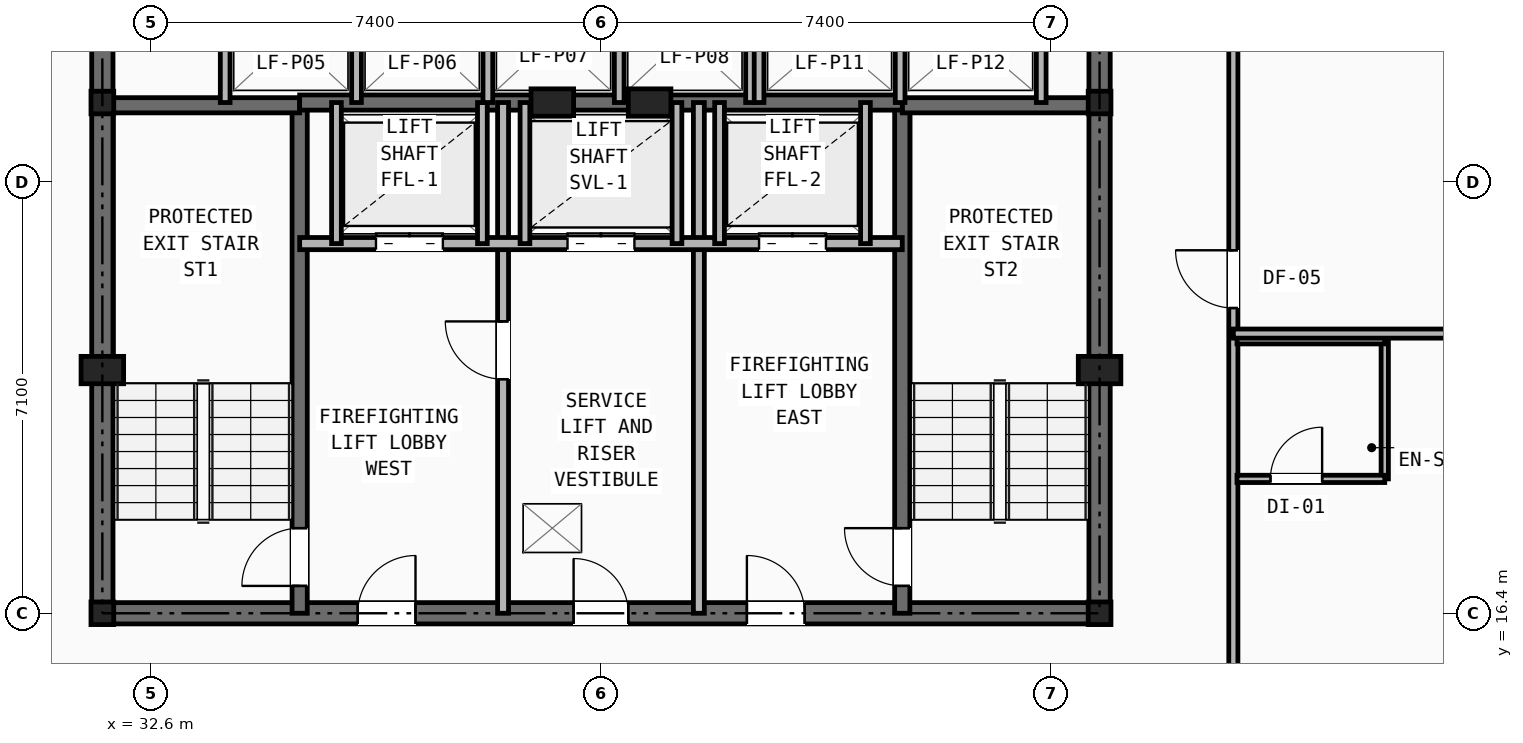
"""IFC4 building model, lengths in metres.
Left out: names, types, materials, properties, quantities, classifications, styles, units other than length and angle.
Written with IfcOpenShell. Run it as: python <this file> out.ifc"""

import sys

from ifc_helpers import new_model, si_unit, direction, frame, frame_2d, origin, origin_2d, place, context, subcontext, project, spatial, rectangle, i_section, extrude, element, fill, save


model = new_model("IFC4")
c1 = context("Model", 3, precision=1e-05, world=origin(), true_north=direction((0.0, 1.0)))
c2 = subcontext(c1, "Body", "Model", "MODEL_VIEW")
j1 = project(units=[si_unit("LENGTHUNIT", "METRE"), si_unit("PLANEANGLEUNIT", "RADIAN")], contexts=[c1])
p1 = place(None, origin())
s1 = spatial("IfcSite", under=j1, at=p1, CompositionType="ELEMENT")
p2 = place(p1, origin())
s2 = spatial("IfcBuilding", under=s1, at=p2, CompositionType="ELEMENT")
p3 = place(p2, frame((0.0, 0.0, 36.8)))
s3 = spatial("IfcBuildingStorey", under=s2, at=p3, CompositionType="ELEMENT", Elevation=36.8)
for number, where, z_axis, x_axis in (
    (1, (31.8, 16.4, 0.0), (0.0, 0.0, 1.0), (1.0, 0.0, 0.0)),
    (2, (48.2, 16.4, 0.0), (0.0, 0.0, 1.0), (1.0, 0.0, 0.0)),
    (3, (31.8, 24.8, 0.0), (0.0, 0.0, 1.0), (1.0, 0.0, 0.0)),
    (4, (48.2, 24.8, 0.0), (0.0, 0.0, 1.0), (1.0, 0.0, 0.0)),
):
    element("IfcColumn", number, at=place(p3, frame(where, z_axis=z_axis, x_axis=x_axis)), inside=s3, PredefinedType="COLUMN", context=c2, shape_type="SweptSolid", body=[
        extrude(i_section(OverallWidth=0.374, OverallDepth=0.372, WebThickness=0.016, FlangeThickness=0.026, at=origin_2d()), origin(), (0.0, 0.0, 1.0), 3.2),
    ])
for number, where, z_axis, x_axis in (
    (5, (31.8, 20.4, 0.0), (0.0, 0.0, 1.0), (1.0, 0.0, 0.0)),
    (6, (48.2, 20.4, 0.0), (0.0, 0.0, 1.0), (1.0, 0.0, 0.0)),
    (7, (39.2, 24.8, 0.0), (0.0, 0.0, 1.0), (1.0, 0.0, 0.0)),
    (8, (40.8, 24.8, 0.0), (0.0, 0.0, 1.0), (1.0, 0.0, 0.0)),
):
    element("IfcColumn", number, at=place(p3, frame(where, z_axis=z_axis, x_axis=x_axis)), inside=s3, PredefinedType="PILASTER", context=c2, shape_type="SweptSolid", body=[
        extrude(rectangle(XDim=0.7, YDim=0.45, at=origin_2d()), origin(), (0.0, 0.0, 1.0), 3.2),
    ])
p4 = place(p3, frame((31.8, 16.4, 0.0), z_axis=(0.0, 0.0, 1.0), x_axis=(1.0, 0.0, 0.0)))
e9 = element("IfcWall", 9, at=p4, inside=s3, PredefinedType="SHEAR", context=c2, shape_type="SweptSolid", body=[
    extrude(rectangle(XDim=16.4, YDim=0.35, at=frame_2d((8.2, 0.0))), origin(), (0.0, 0.0, 1.0), 2.98),
])
p5 = place(p4, frame((7.75, 0.0, 0.0)))
e10 = element("IfcOpeningElement", 10, at=p5, cuts=e9, PredefinedType="OPENING", context=c2, shape_type="SweptSolid", body=[
    extrude(rectangle(XDim=0.9, YDim=2.1, at=frame_2d((0.45, 1.05))), frame((0.0, 0.185, 0.0), z_axis=(0.0, -1.0, 0.0), x_axis=(1.0, 0.0, 0.0)), (0.0, 0.0, 1.0), 0.37),
])
p6 = place(p4, frame((4.2, 0.0, 0.0)))
e11 = element("IfcOpeningElement", 11, at=p6, cuts=e9, PredefinedType="OPENING", context=c2, shape_type="SweptSolid", body=[
    extrude(rectangle(XDim=0.95, YDim=2.1, at=frame_2d((0.475, 1.05))), frame((0.0, 0.185, 0.0), z_axis=(0.0, -1.0, 0.0), x_axis=(1.0, 0.0, 0.0)), (0.0, 0.0, 1.0), 0.37),
])
p7 = place(p4, frame((10.6, 0.0, 0.0)))
e12 = element("IfcOpeningElement", 12, at=p7, cuts=e9, PredefinedType="OPENING", context=c2, shape_type="SweptSolid", body=[
    extrude(rectangle(XDim=0.95, YDim=2.1, at=frame_2d((0.475, 1.05))), frame((0.0, 0.185, 0.0), z_axis=(0.0, -1.0, 0.0), x_axis=(1.0, 0.0, 0.0)), (0.0, 0.0, 1.0), 0.37),
])
p8 = place(p3, frame((31.8, 16.4, 0.0), z_axis=(0.0, 0.0, 1.0), x_axis=(0.0, 1.0, 0.0)))
e13 = element("IfcWall", 13, at=p8, inside=s3, PredefinedType="SHEAR", context=c2, shape_type="SweptSolid", body=[
    extrude(rectangle(XDim=14.8, YDim=0.35, at=frame_2d((7.4, 0.0))), origin(), (0.0, 0.0, 1.0), 2.98),
])
p9 = place(p8, frame((11.0, 0.0, 0.0)))
e14 = element("IfcOpeningElement", 14, at=p9, cuts=e13, PredefinedType="OPENING", context=c2, shape_type="SweptSolid", body=[
    extrude(rectangle(XDim=1.1, YDim=2.15, at=frame_2d((0.55, 1.075))), frame((0.0, 0.185, 0.0), z_axis=(0.0, -1.0, 0.0), x_axis=(1.0, 0.0, 0.0)), (0.0, 0.0, 1.0), 0.37),
])
p10 = place(p3, frame((48.2, 16.4, 0.0), z_axis=(0.0, 0.0, 1.0), x_axis=(0.0, 1.0, 0.0)))
e15 = element("IfcWall", 15, at=p10, inside=s3, PredefinedType="SHEAR", context=c2, shape_type="SweptSolid", body=[
    extrude(rectangle(XDim=14.8, YDim=0.35, at=frame_2d((7.4, 0.0))), origin(), (0.0, 0.0, 1.0), 2.98),
])
p11 = place(p10, frame((11.0, 0.0, 0.0)))
e16 = element("IfcOpeningElement", 16, at=p11, cuts=e15, PredefinedType="OPENING", context=c2, shape_type="SweptSolid", body=[
    extrude(rectangle(XDim=1.1, YDim=2.15, at=frame_2d((0.55, 1.075))), frame((0.0, 0.185, 0.0), z_axis=(0.0, -1.0, 0.0), x_axis=(1.0, 0.0, 0.0)), (0.0, 0.0, 1.0), 0.37),
])
p12 = place(p3, frame((35.045, 16.4, 0.0), z_axis=(0.0, 0.0, 1.0), x_axis=(0.0, 1.0, 0.0)))
e17 = element("IfcWall", 17, at=p12, inside=s3, PredefinedType="SHEAR", context=c2, shape_type="SweptSolid", body=[
    extrude(rectangle(XDim=8.4, YDim=0.25, at=frame_2d((4.2, 0.0))), origin(), (0.0, 0.0, 1.0), 2.98),
])
p13 = place(p12, frame((0.45, 0.0, 0.0)))
e18 = element("IfcOpeningElement", 18, at=p13, cuts=e17, PredefinedType="OPENING", context=c2, shape_type="SweptSolid", body=[
    extrude(rectangle(XDim=0.95, YDim=2.1, at=frame_2d((0.475, 1.05))), frame((0.0, 0.135, 0.0), z_axis=(0.0, -1.0, 0.0), x_axis=(1.0, 0.0, 0.0)), (0.0, 0.0, 1.0), 0.27),
])
p14 = place(p3, frame((31.8, 24.755, 0.0), z_axis=(0.0, 0.0, 1.0), x_axis=(1.0, 0.0, 0.0)))
e19 = element("IfcWall", 19, at=p14, inside=s3, PredefinedType="SHEAR", context=c2, shape_type="SweptSolid", body=[
    extrude(rectangle(XDim=3.245, YDim=0.25, at=frame_2d((1.623, 0.0))), origin(), (0.0, 0.0, 1.0), 2.98),
])
p15 = place(p3, frame((44.955, 16.4, 0.0), z_axis=(0.0, 0.0, 1.0), x_axis=(0.0, 1.0, 0.0)))
e20 = element("IfcWall", 20, at=p15, inside=s3, PredefinedType="SHEAR", context=c2, shape_type="SweptSolid", body=[
    extrude(rectangle(XDim=8.4, YDim=0.25, at=frame_2d((4.2, 0.0))), origin(), (0.0, 0.0, 1.0), 2.98),
])
p16 = place(p15, frame((0.45, 0.0, 0.0)))
e21 = element("IfcOpeningElement", 21, at=p16, cuts=e20, PredefinedType="OPENING", context=c2, shape_type="SweptSolid", body=[
    extrude(rectangle(XDim=0.95, YDim=2.1, at=frame_2d((0.475, 1.05))), frame((0.0, 0.135, 0.0), z_axis=(0.0, -1.0, 0.0), x_axis=(1.0, 0.0, 0.0)), (0.0, 0.0, 1.0), 0.27),
])
p17 = place(p3, frame((44.955, 24.755, 0.0), z_axis=(0.0, 0.0, 1.0), x_axis=(1.0, 0.0, 0.0)))
e22 = element("IfcWall", 22, at=p17, inside=s3, PredefinedType="SHEAR", context=c2, shape_type="SweptSolid", body=[
    extrude(rectangle(XDim=3.245, YDim=0.25, at=frame_2d((1.623, 0.0))), origin(), (0.0, 0.0, 1.0), 2.98),
])
p18 = place(p3, frame((35.045, 24.8, 0.0), z_axis=(0.0, 0.0, 1.0), x_axis=(1.0, 0.0, 0.0)))
e23 = element("IfcWall", 23, at=p18, inside=s3, PredefinedType="SHEAR", context=c2, shape_type="SweptSolid", body=[
    extrude(rectangle(XDim=9.91, YDim=0.25, at=frame_2d((4.955, 0.0))), origin(), (0.0, 0.0, 1.0), 2.98),
])
p19 = place(p3, frame((38.39, 16.4, 0.0), z_axis=(0.0, 0.0, 1.0), x_axis=(0.0, 1.0, 0.0)))
e24 = element("IfcWall", 24, at=p19, inside=s3, PredefinedType="PARTITIONING", context=c2, shape_type="SweptSolid", body=[
    extrude(rectangle(XDim=8.4, YDim=0.18, at=frame_2d((4.2, 0.0))), origin(), (0.0, 0.0, 1.0), 2.431),
])
p20 = place(p19, frame((3.85, 0.0, 0.0)))
e25 = element("IfcOpeningElement", 25, at=p20, cuts=e24, PredefinedType="OPENING", context=c2, shape_type="SweptSolid", body=[
    extrude(rectangle(XDim=0.95, YDim=2.1, at=frame_2d((0.475, 1.05))), frame((0.0, 0.1, 0.0), z_axis=(0.0, -1.0, 0.0), x_axis=(1.0, 0.0, 0.0)), (0.0, 0.0, 1.0), 0.2),
])
p21 = place(p3, frame((41.61, 16.4, 0.0), z_axis=(0.0, 0.0, 1.0), x_axis=(0.0, 1.0, 0.0)))
e26 = element("IfcWall", 26, at=p21, inside=s3, PredefinedType="PARTITIONING", context=c2, shape_type="SweptSolid", body=[
    extrude(rectangle(XDim=8.4, YDim=0.18, at=frame_2d((4.2, 0.0))), origin(), (0.0, 0.0, 1.0), 2.431),
])
p22 = place(p3, frame((35.045, 22.48, 0.0), z_axis=(0.0, 0.0, 1.0), x_axis=(1.0, 0.0, 0.0)))
e27 = element("IfcWall", 27, at=p22, inside=s3, PredefinedType="SOLIDWALL", context=c2, shape_type="SweptSolid", body=[
    extrude(rectangle(XDim=9.91, YDim=0.2, at=frame_2d((4.955, 0.0))), origin(), (0.0, 0.0, 1.0), 2.98),
])
p23 = place(p22, frame((1.255, 0.0, 0.0)))
e28 = element("IfcOpeningElement", 28, at=p23, cuts=e27, PredefinedType="OPENING", context=c2, shape_type="SweptSolid", body=[
    extrude(rectangle(XDim=1.1, YDim=2.15, at=frame_2d((0.55, 1.075))), frame((0.0, 0.11, 0.0), z_axis=(0.0, -1.0, 0.0), x_axis=(1.0, 0.0, 0.0)), (0.0, 0.0, 1.0), 0.22),
])
p24 = place(p22, frame((7.555, 0.0, 0.0)))
e29 = element("IfcOpeningElement", 29, at=p24, cuts=e27, PredefinedType="OPENING", context=c2, shape_type="SweptSolid", body=[
    extrude(rectangle(XDim=1.1, YDim=2.15, at=frame_2d((0.55, 1.075))), frame((0.0, 0.11, 0.0), z_axis=(0.0, -1.0, 0.0), x_axis=(1.0, 0.0, 0.0)), (0.0, 0.0, 1.0), 0.22),
])
p25 = place(p22, frame((4.405, 0.0, 0.0)))
e30 = element("IfcOpeningElement", 30, at=p25, cuts=e27, PredefinedType="OPENING", context=c2, shape_type="SweptSolid", body=[
    extrude(rectangle(XDim=1.1, YDim=2.15, at=frame_2d((0.55, 1.075))), frame((0.0, 0.11, 0.0), z_axis=(0.0, -1.0, 0.0), x_axis=(1.0, 0.0, 0.0)), (0.0, 0.0, 1.0), 0.22),
])
for number, where, z_axis, x_axis in (
    (31, (35.65, 22.48, 0.0), (0.0, 0.0, 1.0), (0.0, 1.0, 0.0)),
    (32, (38.05, 22.48, 0.0), (0.0, 0.0, 1.0), (0.0, 1.0, 0.0)),
    (33, (41.95, 22.48, 0.0), (0.0, 0.0, 1.0), (0.0, 1.0, 0.0)),
    (34, (44.35, 22.48, 0.0), (0.0, 0.0, 1.0), (0.0, 1.0, 0.0)),
    (35, (38.75, 22.48, 0.0), (0.0, 0.0, 1.0), (0.0, 1.0, 0.0)),
    (36, (41.25, 22.48, 0.0), (0.0, 0.0, 1.0), (0.0, 1.0, 0.0)),
):
    element("IfcWall", number, at=place(p3, frame(where, z_axis=z_axis, x_axis=x_axis)), inside=s3, PredefinedType="SOLIDWALL", context=c2, shape_type="SweptSolid", body=[
        extrude(rectangle(XDim=2.32, YDim=0.16, at=frame_2d((1.16, 0.0))), origin(), (0.0, 0.0, 1.0), 2.98),
    ])
for number, where, z_axis, x_axis in (
    (37, (33.82, 24.8, 0.0), (0.0, 0.0, 1.0), (0.0, 1.0, 0.0)),
    (38, (35.98, 24.8, 0.0), (0.0, 0.0, 1.0), (0.0, 1.0, 0.0)),
    (39, (38.14, 24.8, 0.0), (0.0, 0.0, 1.0), (0.0, 1.0, 0.0)),
    (40, (40.3, 24.8, 0.0), (0.0, 0.0, 1.0), (0.0, 1.0, 0.0)),
    (41, (42.46, 24.8, 0.0), (0.0, 0.0, 1.0), (0.0, 1.0, 0.0)),
    (42, (42.6, 24.8, 0.0), (0.0, 0.0, 1.0), (0.0, 1.0, 0.0)),
    (43, (44.92, 24.8, 0.0), (0.0, 0.0, 1.0), (0.0, 1.0, 0.0)),
    (44, (47.24, 24.8, 0.0), (0.0, 0.0, 1.0), (0.0, 1.0, 0.0)),
):
    element("IfcWall", number, at=place(p3, frame(where, z_axis=z_axis, x_axis=x_axis)), inside=s3, PredefinedType="SOLIDWALL", context=c2, shape_type="SweptSolid", body=[
        extrude(rectangle(XDim=2.08, YDim=0.16, at=frame_2d((1.04, 0.0))), origin(), (0.0, 0.0, 1.0), 2.98),
    ])
p26 = place(p3, frame((50.4, 14.1, 0.0), z_axis=(0.0, 0.0, 1.0), x_axis=(0.0, 1.0, 0.0)))
e45 = element("IfcWall", 45, at=p26, inside=s3, PredefinedType="PARTITIONING", context=c2, shape_type="SweptSolid", body=[
    extrude(rectangle(XDim=21.9, YDim=0.15, at=frame_2d((10.95, 0.0))), origin(), (0.0, 0.0, 1.0), 2.431),
])
p27 = place(p26, frame((0.42, 0.0, 0.0)))
e46 = element("IfcOpeningElement", 46, at=p27, cuts=e45, PredefinedType="OPENING", context=c2, shape_type="SweptSolid", body=[
    extrude(rectangle(XDim=0.95, YDim=2.1, at=frame_2d((0.475, 1.05))), frame((0.0, 0.085, 0.0), z_axis=(0.0, -1.0, 0.0), x_axis=(1.0, 0.0, 0.0)), (0.0, 0.0, 1.0), 0.17),
])
p28 = place(p26, frame((7.32, 0.0, 0.0)))
e47 = element("IfcOpeningElement", 47, at=p28, cuts=e45, PredefinedType="OPENING", context=c2, shape_type="SweptSolid", body=[
    extrude(rectangle(XDim=0.95, YDim=2.1, at=frame_2d((0.475, 1.05))), frame((0.0, 0.085, 0.0), z_axis=(0.0, -1.0, 0.0), x_axis=(1.0, 0.0, 0.0)), (0.0, 0.0, 1.0), 0.17),
])
p29 = place(p26, frame((15.82, 0.0, 0.0)))
e48 = element("IfcOpeningElement", 48, at=p29, cuts=e45, PredefinedType="OPENING", context=c2, shape_type="SweptSolid", body=[
    extrude(rectangle(XDim=0.95, YDim=2.1, at=frame_2d((0.475, 1.05))), frame((0.0, 0.085, 0.0), z_axis=(0.0, -1.0, 0.0), x_axis=(1.0, 0.0, 0.0)), (0.0, 0.0, 1.0), 0.17),
])
p30 = place(p3, frame((52.89, 18.61, 0.0), z_axis=(0.0, 0.0, 1.0), x_axis=(0.0, 1.0, 0.0)))
e49 = element("IfcWall", 49, at=p30, inside=s3, PredefinedType="PARTITIONING", context=c2, shape_type="SweptSolid", body=[
    extrude(rectangle(XDim=2.28, YDim=0.12, at=frame_2d((1.14, 0.0))), origin(), (0.0, 0.0, 1.0), 2.98),
])
p31 = place(p3, frame((50.46, 18.61, 0.0), z_axis=(0.0, 0.0, 1.0), x_axis=(1.0, 0.0, 0.0)))
e50 = element("IfcWall", 50, at=p31, inside=s3, PredefinedType="PARTITIONING", context=c2, shape_type="SweptSolid", body=[
    extrude(rectangle(XDim=2.43, YDim=0.12, at=frame_2d((1.215, 0.0))), origin(), (0.0, 0.0, 1.0), 2.98),
])
p32 = place(p31, frame((0.55, 0.0, 0.0)))
e51 = element("IfcOpeningElement", 51, at=p32, cuts=e50, PredefinedType="OPENING", context=c2, shape_type="SweptSolid", body=[
    extrude(rectangle(XDim=0.85, YDim=2.05, at=frame_2d((0.425, 1.025))), frame((0.0, 0.07, 0.0), z_axis=(0.0, -1.0, 0.0), x_axis=(1.0, 0.0, 0.0)), (0.0, 0.0, 1.0), 0.14),
])
p33 = place(p3, frame((50.46, 20.89, 0.0), z_axis=(0.0, 0.0, 1.0), x_axis=(1.0, 0.0, 0.0)))
e52 = element("IfcWall", 52, at=p33, inside=s3, PredefinedType="PARTITIONING", context=c2, shape_type="SweptSolid", body=[
    extrude(rectangle(XDim=2.43, YDim=0.12, at=frame_2d((1.215, 0.0))), origin(), (0.0, 0.0, 1.0), 2.98),
])
p34 = place(p3, frame((50.4, 21.0, 0.0), z_axis=(0.0, 0.0, 1.0), x_axis=(1.0, 0.0, 0.0)))
e53 = element("IfcWall", 53, at=p34, inside=s3, PredefinedType="PARTITIONING", context=c2, shape_type="SweptSolid", body=[
    extrude(rectangle(XDim=14.622, YDim=0.15, at=frame_2d((7.311, 0.0))), origin(), (0.0, 0.0, 1.0), 2.268),
])
p35 = place(p5, origin())
e54 = element("IfcDoor", 54, at=p35, inside=s3, OperationType="SINGLE_SWING_LEFT", PredefinedType="DOOR", context=c2, shape_type="SweptSolid", body=[
    extrude(rectangle(XDim=0.9, YDim=2.1, at=frame_2d((0.45, 1.05))), frame((0.0, 0.025, 0.0), z_axis=(0.0, -1.0, 0.0), x_axis=(1.0, 0.0, 0.0)), (0.0, 0.0, 1.0), 0.05),
])
fill(e10, e54)
p36 = place(p20, origin())
e55 = element("IfcDoor", 55, at=p36, inside=s3, OperationType="SINGLE_SWING_RIGHT", PredefinedType="DOOR", context=c2, shape_type="SweptSolid", body=[
    extrude(rectangle(XDim=0.95, YDim=2.1, at=frame_2d((0.475, 1.05))), frame((0.0, 0.025, 0.0), z_axis=(0.0, -1.0, 0.0), x_axis=(1.0, 0.0, 0.0)), (0.0, 0.0, 1.0), 0.05),
])
fill(e25, e55)
p37 = place(p13, origin())
e56 = element("IfcDoor", 56, at=p37, inside=s3, OperationType="SINGLE_SWING_LEFT", PredefinedType="DOOR", context=c2, shape_type="SweptSolid", body=[
    extrude(rectangle(XDim=0.95, YDim=2.1, at=frame_2d((0.475, 1.05))), frame((0.0, 0.025, 0.0), z_axis=(0.0, -1.0, 0.0), x_axis=(1.0, 0.0, 0.0)), (0.0, 0.0, 1.0), 0.05),
])
fill(e18, e56)
p38 = place(p16, origin())
e57 = element("IfcDoor", 57, at=p38, inside=s3, OperationType="SINGLE_SWING_RIGHT", PredefinedType="DOOR", context=c2, shape_type="SweptSolid", body=[
    extrude(rectangle(XDim=0.95, YDim=2.1, at=frame_2d((0.475, 1.05))), frame((0.0, 0.025, 0.0), z_axis=(0.0, -1.0, 0.0), x_axis=(1.0, 0.0, 0.0)), (0.0, 0.0, 1.0), 0.05),
])
fill(e21, e57)
p39 = place(p6, origin())
e58 = element("IfcDoor", 58, at=p39, inside=s3, OperationType="SINGLE_SWING_RIGHT", PredefinedType="DOOR", context=c2, shape_type="SweptSolid", body=[
    extrude(rectangle(XDim=0.95, YDim=2.1, at=frame_2d((0.475, 1.05))), frame((0.0, 0.025, 0.0), z_axis=(0.0, -1.0, 0.0), x_axis=(1.0, 0.0, 0.0)), (0.0, 0.0, 1.0), 0.05),
])
fill(e11, e58)
p40 = place(p7, origin())
e59 = element("IfcDoor", 59, at=p40, inside=s3, OperationType="SINGLE_SWING_LEFT", PredefinedType="DOOR", context=c2, shape_type="SweptSolid", body=[
    extrude(rectangle(XDim=0.95, YDim=2.1, at=frame_2d((0.475, 1.05))), frame((0.0, 0.025, 0.0), z_axis=(0.0, -1.0, 0.0), x_axis=(1.0, 0.0, 0.0)), (0.0, 0.0, 1.0), 0.05),
])
fill(e12, e59)
p41 = place(p23, origin())
e60 = element("IfcDoor", 60, at=p41, inside=s3, OperationType="DOUBLE_DOOR_SLIDING", PredefinedType="DOOR", context=c2, shape_type="SweptSolid", body=[
    extrude(rectangle(XDim=1.1, YDim=2.15, at=frame_2d((0.55, 1.075))), frame((0.0, 0.025, 0.0), z_axis=(0.0, -1.0, 0.0), x_axis=(1.0, 0.0, 0.0)), (0.0, 0.0, 1.0), 0.05),
])
fill(e28, e60)
p42 = place(p24, origin())
e61 = element("IfcDoor", 61, at=p42, inside=s3, OperationType="DOUBLE_DOOR_SLIDING", PredefinedType="DOOR", context=c2, shape_type="SweptSolid", body=[
    extrude(rectangle(XDim=1.1, YDim=2.15, at=frame_2d((0.55, 1.075))), frame((0.0, 0.025, 0.0), z_axis=(0.0, -1.0, 0.0), x_axis=(1.0, 0.0, 0.0)), (0.0, 0.0, 1.0), 0.05),
])
fill(e29, e61)
p43 = place(p25, origin())
e62 = element("IfcDoor", 62, at=p43, inside=s3, OperationType="DOUBLE_DOOR_SLIDING", PredefinedType="DOOR", context=c2, shape_type="SweptSolid", body=[
    extrude(rectangle(XDim=1.1, YDim=2.15, at=frame_2d((0.55, 1.075))), frame((0.0, 0.025, 0.0), z_axis=(0.0, -1.0, 0.0), x_axis=(1.0, 0.0, 0.0)), (0.0, 0.0, 1.0), 0.05),
])
fill(e30, e62)
p44 = place(p32, origin())
e63 = element("IfcDoor", 63, at=p44, inside=s3, OperationType="SINGLE_SWING_RIGHT", PredefinedType="DOOR", context=c2, shape_type="SweptSolid", body=[
    extrude(rectangle(XDim=0.85, YDim=2.05, at=frame_2d((0.425, 1.025))), frame((0.0, 0.025, 0.0), z_axis=(0.0, -1.0, 0.0), x_axis=(1.0, 0.0, 0.0)), (0.0, 0.0, 1.0), 0.05),
])
fill(e51, e63)
p45 = place(p28, origin())
e64 = element("IfcDoor", 64, at=p45, inside=s3, OperationType="SINGLE_SWING_RIGHT", PredefinedType="DOOR", context=c2, shape_type="SweptSolid", body=[
    extrude(rectangle(XDim=0.95, YDim=2.1, at=frame_2d((0.475, 1.05))), frame((0.0, 0.025, 0.0), z_axis=(0.0, -1.0, 0.0), x_axis=(1.0, 0.0, 0.0)), (0.0, 0.0, 1.0), 0.05),
])
fill(e47, e64)
save(model, sys.argv[1])
